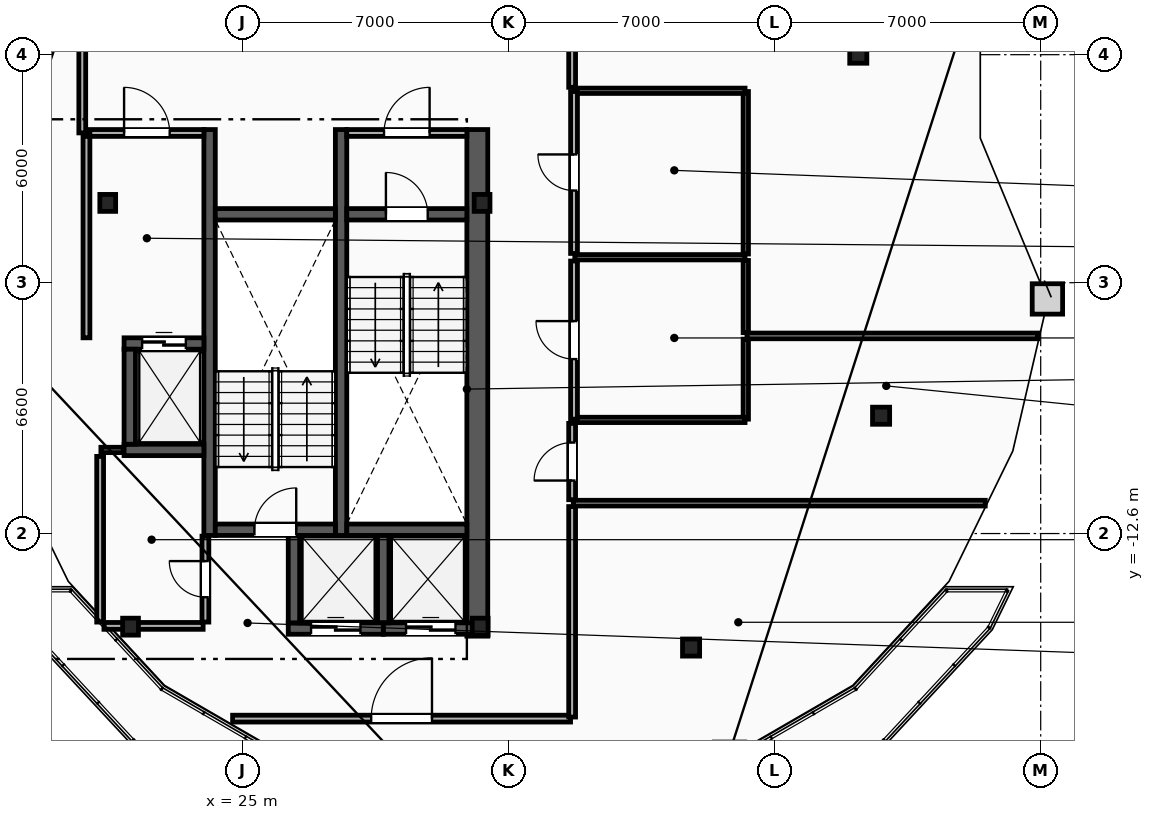
"""IFC4 building model, lengths in metres.
Left out: names, types, materials, properties, quantities, classifications, styles, units other than length and angle.
Written with IfcOpenShell. Run it as: python <this file> out.ifc"""

import sys

from ifc_helpers import new_model, si_unit, direction, frame, frame_2d, origin, origin_2d, place, context, subcontext, project, spatial, rectangle, hollow_rectangle, i_section, extrude, element, fill, save


model = new_model("IFC4")
c1 = context("Model", 3, precision=1e-05, world=origin(), true_north=direction((0.0, 1.0)))
c2 = subcontext(c1, "Body", "Model", "MODEL_VIEW")
j1 = project(units=[si_unit("LENGTHUNIT", "METRE"), si_unit("PLANEANGLEUNIT", "RADIAN")], contexts=[c1])
p1 = place(None, origin())
s1 = spatial("IfcSite", under=j1, at=p1, CompositionType="ELEMENT")
p2 = place(p1, origin())
s2 = spatial("IfcBuilding", under=s1, at=p2, CompositionType="ELEMENT")
p3 = place(p2, frame((0.0, 0.0, 282.8)))
s3 = spatial("IfcBuildingStorey", under=s2, at=p3, CompositionType="ELEMENT", Elevation=282.8)
for number, where, z_axis, x_axis in (
    (1, (31.3, -3.9, 0.0), (0.0, 0.0, 1.0), (1.0, 0.0, 0.0)),
    (2, (21.45, -3.9, 0.0), (0.0, 0.0, 1.0), (1.0, 0.0, 0.0)),
    (3, (22.05, -15.05, 0.0), (0.0, 0.0, 1.0), (1.0, 0.0, 0.0)),
    (4, (31.25, -15.05, 0.0), (0.0, 0.0, 1.0), (1.0, 0.0, 0.0)),
):
    element("IfcColumn", number, at=place(p3, frame(where, z_axis=z_axis, x_axis=x_axis)), inside=s3, PredefinedType="COLUMN", context=c2, shape_type="SweptSolid", body=[
        extrude(i_section(OverallWidth=0.416, OverallDepth=0.446, WebThickness=0.039, FlangeThickness=0.063, FilletRadius=0.018, at=origin_2d()), origin(), (0.0, 0.0, 1.0), 3.6),
    ])
for number, where, z_axis, x_axis in (
    (5, (41.2, 0.0, 0.0), (0.0, 0.0, 1.0), (1.0, 0.0, 0.0)),
    (6, (41.8, -9.5, 0.0), (0.0, 0.0, 1.0), (1.0, 0.0, 0.0)),
    (7, (36.8, -15.6, 0.0), (0.0, 0.0, 1.0), (1.0, 0.0, 0.0)),
):
    element("IfcColumn", number, at=place(p3, frame(where, z_axis=z_axis, x_axis=x_axis)), inside=s3, PredefinedType="COLUMN", context=c2, shape_type="SweptSolid", body=[
        extrude(hollow_rectangle(XDim=0.45, YDim=0.45, WallThickness=0.025, at=origin_2d()), origin(), (0.0, 0.0, 1.0), 3.6),
    ])
p4 = place(p3, frame((31.175, -15.3, 0.0), z_axis=(0.0, 0.0, 1.0), x_axis=(0.0, 1.0, 0.0)))
e8 = element("IfcWall", 8, at=p4, inside=s3, PredefinedType="SHEAR", context=c2, shape_type="SweptSolid", body=[
    extrude(rectangle(XDim=13.33, YDim=0.55, at=frame_2d((6.665, 0.0))), origin(), (0.0, 0.0, 1.0), 3.34),
])
for number, where, z_axis, x_axis in (
    (9, (27.59, -12.65, 0.0), (0.0, 0.0, 1.0), (0.0, 1.0, 0.0)),
    (10, (24.13, -12.65, 0.0), (0.0, 0.0, 1.0), (0.0, 1.0, 0.0)),
):
    element("IfcWall", number, at=place(p3, frame(where, z_axis=z_axis, x_axis=x_axis)), inside=s3, PredefinedType="SHEAR", context=c2, shape_type="SweptSolid", body=[
        extrude(rectangle(XDim=10.68, YDim=0.3, at=frame_2d((5.34, 0.0))), origin(), (0.0, 0.0, 1.0), 3.34),
    ])
p5 = place(p3, frame((27.74, -4.2, 0.0), z_axis=(0.0, 0.0, 1.0), x_axis=(1.0, 0.0, 0.0)))
e11 = element("IfcWall", 11, at=p5, inside=s3, PredefinedType="SHEAR", context=c2, shape_type="SweptSolid", body=[
    extrude(rectangle(XDim=3.16, YDim=0.3, at=frame_2d((1.58, 0.0))), origin(), (0.0, 0.0, 1.0), 3.34),
])
p6 = place(p5, frame((1.03, 0.0, 0.0)))
e12 = element("IfcOpeningElement", 12, at=p6, cuts=e11, PredefinedType="OPENING", context=c2, shape_type="SweptSolid", body=[
    extrude(rectangle(XDim=1.1, YDim=2.15, at=frame_2d((0.55, 1.075))), frame((0.0, 0.16, 0.0), z_axis=(0.0, -1.0, 0.0), x_axis=(1.0, 0.0, 0.0)), (0.0, 0.0, 1.0), 0.32),
])
p7 = place(p3, frame((27.74, -12.5, 0.0), z_axis=(0.0, 0.0, 1.0), x_axis=(1.0, 0.0, 0.0)))
e13 = element("IfcWall", 13, at=p7, inside=s3, PredefinedType="SHEAR", context=c2, shape_type="SweptSolid", body=[
    extrude(rectangle(XDim=3.16, YDim=0.3, at=frame_2d((1.58, 0.0))), origin(), (0.0, 0.0, 1.0), 3.34),
])
p8 = place(p3, frame((24.28, -12.5, 0.0), z_axis=(0.0, 0.0, 1.0), x_axis=(1.0, 0.0, 0.0)))
e14 = element("IfcWall", 14, at=p8, inside=s3, PredefinedType="SHEAR", context=c2, shape_type="SweptSolid", body=[
    extrude(rectangle(XDim=3.16, YDim=0.3, at=frame_2d((1.58, 0.0))), origin(), (0.0, 0.0, 1.0), 3.34),
])
p9 = place(p8, frame((1.03, 0.0, 0.0)))
e15 = element("IfcOpeningElement", 15, at=p9, cuts=e14, PredefinedType="OPENING", context=c2, shape_type="SweptSolid", body=[
    extrude(rectangle(XDim=1.1, YDim=2.15, at=frame_2d((0.55, 1.075))), frame((0.0, 0.16, 0.0), z_axis=(0.0, -1.0, 0.0), x_axis=(1.0, 0.0, 0.0)), (0.0, 0.0, 1.0), 0.32),
])
p10 = place(p3, frame((24.28, -4.2, 0.0), z_axis=(0.0, 0.0, 1.0), x_axis=(1.0, 0.0, 0.0)))
e16 = element("IfcWall", 16, at=p10, inside=s3, PredefinedType="SHEAR", context=c2, shape_type="SweptSolid", body=[
    extrude(rectangle(XDim=3.16, YDim=0.3, at=frame_2d((1.58, 0.0))), origin(), (0.0, 0.0, 1.0), 3.34),
])
p11 = place(p3, frame((20.89, -7.45, 0.0), z_axis=(0.0, 0.0, 1.0), x_axis=(0.0, 1.0, 0.0)))
e17 = element("IfcWall", 17, at=p11, inside=s3, PredefinedType="PARTITIONING", context=c2, shape_type="SweptSolid", body=[
    extrude(rectangle(XDim=5.3, YDim=0.18, at=frame_2d((2.65, 0.0))), origin(), (0.0, 0.0, 1.0), 3.34),
])
p12 = place(p3, frame((20.98, -2.06, 0.0), z_axis=(0.0, 0.0, 1.0), x_axis=(1.0, 0.0, 0.0)))
e18 = element("IfcWall", 18, at=p12, inside=s3, PredefinedType="PARTITIONING", context=c2, shape_type="SweptSolid", body=[
    extrude(rectangle(XDim=3.0, YDim=0.18, at=frame_2d((1.5, 0.0))), origin(), (0.0, 0.0, 1.0), 3.34),
])
p13 = place(p12, frame((0.9, 0.0, 0.0)))
e19 = element("IfcOpeningElement", 19, at=p13, cuts=e18, PredefinedType="OPENING", context=c2, shape_type="SweptSolid", body=[
    extrude(rectangle(XDim=1.2, YDim=2.15, at=frame_2d((0.6, 1.075))), frame((0.0, 0.1, 0.0), z_axis=(0.0, -1.0, 0.0), x_axis=(1.0, 0.0, 0.0)), (0.0, 0.0, 1.0), 0.2),
])
p14 = place(p3, frame((27.74, -2.06, 0.0), z_axis=(0.0, 0.0, 1.0), x_axis=(1.0, 0.0, 0.0)))
e20 = element("IfcWall", 20, at=p14, inside=s3, PredefinedType="PARTITIONING", context=c2, shape_type="SweptSolid", body=[
    extrude(rectangle(XDim=3.16, YDim=0.18, at=frame_2d((1.58, 0.0))), origin(), (0.0, 0.0, 1.0), 3.34),
])
p15 = place(p14, frame((0.98, 0.0, 0.0)))
e21 = element("IfcOpeningElement", 21, at=p15, cuts=e20, PredefinedType="OPENING", context=c2, shape_type="SweptSolid", body=[
    extrude(rectangle(XDim=1.2, YDim=2.15, at=frame_2d((0.6, 1.075))), frame((0.0, 0.1, 0.0), z_axis=(0.0, -1.0, 0.0), x_axis=(1.0, 0.0, 0.0)), (0.0, 0.0, 1.0), 0.2),
])
p16 = place(p3, frame((21.88, -7.6, 0.0), z_axis=(0.0, 0.0, 1.0), x_axis=(1.0, 0.0, 0.0)))
e22 = element("IfcWall", 22, at=p16, inside=s3, PredefinedType="SHEAR", context=c2, shape_type="SweptSolid", body=[
    extrude(rectangle(XDim=2.1, YDim=0.3, at=frame_2d((1.05, 0.0))), origin(), (0.0, 0.0, 1.0), 3.34),
])
p17 = place(p16, frame((0.475, 0.0, 0.0)))
e23 = element("IfcOpeningElement", 23, at=p17, cuts=e22, PredefinedType="OPENING", context=c2, shape_type="SweptSolid", body=[
    extrude(rectangle(XDim=1.15, YDim=2.2, at=frame_2d((0.575, 1.1))), frame((0.0, 0.16, 0.0), z_axis=(0.0, -1.0, 0.0), x_axis=(1.0, 0.0, 0.0)), (0.0, 0.0, 1.0), 0.32),
])
p18 = place(p3, frame((21.88, -10.4, 0.0), z_axis=(0.0, 0.0, 1.0), x_axis=(1.0, 0.0, 0.0)))
e24 = element("IfcWall", 24, at=p18, inside=s3, PredefinedType="SHEAR", context=c2, shape_type="SweptSolid", body=[
    extrude(rectangle(XDim=2.1, YDim=0.3, at=frame_2d((1.05, 0.0))), origin(), (0.0, 0.0, 1.0), 3.34),
])
p19 = place(p3, frame((22.03, -10.25, 0.0), z_axis=(0.0, 0.0, 1.0), x_axis=(0.0, 1.0, 0.0)))
e25 = element("IfcWall", 25, at=p19, inside=s3, PredefinedType="SHEAR", context=c2, shape_type="SweptSolid", body=[
    extrude(rectangle(XDim=2.5, YDim=0.3, at=frame_2d((1.25, 0.0))), origin(), (0.0, 0.0, 1.0), 3.34),
])
p20 = place(p3, frame((28.7, -15.1, 0.0), z_axis=(0.0, 0.0, 1.0), x_axis=(1.0, 0.0, 0.0)))
e26 = element("IfcWall", 26, at=p20, inside=s3, PredefinedType="SHEAR", context=c2, shape_type="SweptSolid", body=[
    extrude(rectangle(XDim=2.5, YDim=0.3, at=frame_2d((1.25, 0.0))), origin(), (0.0, 0.0, 1.0), 3.34),
])
p21 = place(p20, frame((0.6, 0.0, 0.0)))
e27 = element("IfcOpeningElement", 27, at=p21, cuts=e26, PredefinedType="OPENING", context=c2, shape_type="SweptSolid", body=[
    extrude(rectangle(XDim=1.3, YDim=2.2, at=frame_2d((0.65, 1.1))), frame((0.0, 0.16, 0.0), z_axis=(0.0, -1.0, 0.0), x_axis=(1.0, 0.0, 0.0)), (0.0, 0.0, 1.0), 0.32),
])
p22 = place(p3, frame((28.7, -14.95, 0.0), z_axis=(0.0, 0.0, 1.0), x_axis=(0.0, 1.0, 0.0)))
e28 = element("IfcWall", 28, at=p22, inside=s3, PredefinedType="SHEAR", context=c2, shape_type="SweptSolid", body=[
    extrude(rectangle(XDim=2.3, YDim=0.3, at=frame_2d((1.15, 0.0))), origin(), (0.0, 0.0, 1.0), 3.34),
])
p23 = place(p3, frame((26.2, -15.1, 0.0), z_axis=(0.0, 0.0, 1.0), x_axis=(1.0, 0.0, 0.0)))
e29 = element("IfcWall", 29, at=p23, inside=s3, PredefinedType="SHEAR", context=c2, shape_type="SweptSolid", body=[
    extrude(rectangle(XDim=2.5, YDim=0.3, at=frame_2d((1.25, 0.0))), origin(), (0.0, 0.0, 1.0), 3.34),
])
p24 = place(p23, frame((0.6, 0.0, 0.0)))
e30 = element("IfcOpeningElement", 30, at=p24, cuts=e29, PredefinedType="OPENING", context=c2, shape_type="SweptSolid", body=[
    extrude(rectangle(XDim=1.3, YDim=2.2, at=frame_2d((0.65, 1.1))), frame((0.0, 0.16, 0.0), z_axis=(0.0, -1.0, 0.0), x_axis=(1.0, 0.0, 0.0)), (0.0, 0.0, 1.0), 0.32),
])
p25 = place(p3, frame((26.35, -14.95, 0.0), z_axis=(0.0, 0.0, 1.0), x_axis=(0.0, 1.0, 0.0)))
e31 = element("IfcWall", 31, at=p25, inside=s3, PredefinedType="SHEAR", context=c2, shape_type="SweptSolid", body=[
    extrude(rectangle(XDim=2.3, YDim=0.3, at=frame_2d((1.15, 0.0))), origin(), (0.0, 0.0, 1.0), 3.34),
])
p26 = place(p3, frame((21.27, -10.4, 0.0), z_axis=(0.0, 0.0, 1.0), x_axis=(1.0, 0.0, 0.0)))
e32 = element("IfcWall", 32, at=p26, inside=s3, PredefinedType="PARTITIONING", context=c2, shape_type="SweptSolid", body=[
    extrude(rectangle(XDim=0.59, YDim=0.14, at=frame_2d((0.295, 0.0))), origin(), (0.0, 0.0, 1.0), 3.34),
])
p27 = place(p3, frame((21.25, -14.93, 0.0), z_axis=(0.0, 0.0, 1.0), x_axis=(0.0, 1.0, 0.0)))
e33 = element("IfcWall", 33, at=p27, inside=s3, PredefinedType="PARTITIONING", context=c2, shape_type="SweptSolid", body=[
    extrude(rectangle(XDim=4.36, YDim=0.18, at=frame_2d((2.18, 0.0))), origin(), (0.0, 0.0, 1.0), 3.34),
])
p28 = place(p3, frame((21.35, -15.03, 0.0), z_axis=(0.0, 0.0, 1.0), x_axis=(1.0, 0.0, 0.0)))
e34 = element("IfcWall", 34, at=p28, inside=s3, PredefinedType="PARTITIONING", context=c2, shape_type="SweptSolid", body=[
    extrude(rectangle(XDim=2.61, YDim=0.18, at=frame_2d((1.305, 0.0))), origin(), (0.0, 0.0, 1.0), 2.413),
])
p29 = place(p3, frame((24.02, -14.93, 0.0), z_axis=(0.0, 0.0, 1.0), x_axis=(0.0, 1.0, 0.0)))
e35 = element("IfcWall", 35, at=p29, inside=s3, PredefinedType="PARTITIONING", context=c2, shape_type="SweptSolid", body=[
    extrude(rectangle(XDim=2.26, YDim=0.18, at=frame_2d((1.13, 0.0))), origin(), (0.0, 0.0, 1.0), 3.34),
])
p30 = place(p29, frame((0.655, 0.0, 0.0)))
e36 = element("IfcOpeningElement", 36, at=p30, cuts=e35, PredefinedType="OPENING", context=c2, shape_type="SweptSolid", body=[
    extrude(rectangle(XDim=0.95, YDim=2.1, at=frame_2d((0.475, 1.05))), frame((0.0, 0.1, 0.0), z_axis=(0.0, -1.0, 0.0), x_axis=(1.0, 0.0, 0.0)), (0.0, 0.0, 1.0), 0.2),
])
p31 = place(p3, frame((38.24, -9.59, 0.0), z_axis=(0.0, 0.0, 1.0), x_axis=(0.0, 1.0, 0.0)))
e37 = element("IfcWall", 37, at=p31, inside=s3, PredefinedType="PARTITIONING", context=c2, shape_type="SweptSolid", body=[
    extrude(rectangle(XDim=2.105, YDim=0.14, at=frame_2d((1.052, 0.0))), origin(), (0.0, 0.0, 1.0), 3.34),
])
p32 = place(p3, frame((38.24, -7.315, 0.0), z_axis=(0.0, 0.0, 1.0), x_axis=(0.0, 1.0, 0.0)))
e38 = element("IfcWall", 38, at=p32, inside=s3, PredefinedType="PARTITIONING", context=c2, shape_type="SweptSolid", body=[
    extrude(rectangle(XDim=1.9, YDim=0.14, at=frame_2d((0.95, 0.0))), origin(), (0.0, 0.0, 1.0), 3.34),
])
p33 = place(p3, frame((38.24, -5.245, 0.0), z_axis=(0.0, 0.0, 1.0), x_axis=(0.0, 1.0, 0.0)))
e39 = element("IfcWall", 39, at=p33, inside=s3, PredefinedType="PARTITIONING", context=c2, shape_type="SweptSolid", body=[
    extrude(rectangle(XDim=4.275, YDim=0.14, at=frame_2d((2.138, 0.0))), origin(), (0.0, 0.0, 1.0), 3.34),
])
for number, where, z_axis, x_axis in (
    (40, (33.74, -0.95, 0.0), (0.0, 0.0, 1.0), (1.0, 0.0, 0.0)),
    (41, (33.74, -5.33, 0.0), (0.0, 0.0, 1.0), (1.0, 0.0, 0.0)),
    (42, (33.74, -9.61, 0.0), (0.0, 0.0, 1.0), (1.0, 0.0, 0.0)),
):
    element("IfcWall", number, at=place(p3, frame(where, z_axis=z_axis, x_axis=x_axis)), inside=s3, PredefinedType="PARTITIONING", context=c2, shape_type="SweptSolid", body=[
        extrude(rectangle(XDim=4.48, YDim=0.14, at=frame_2d((2.24, 0.0))), origin(), (0.0, 0.0, 1.0), 3.34),
    ])
p34 = place(p3, frame((33.72, -5.23, 0.0), z_axis=(0.0, 0.0, 1.0), x_axis=(0.0, 1.0, 0.0)))
e43 = element("IfcWall", 43, at=p34, inside=s3, PredefinedType="PARTITIONING", context=c2, shape_type="SweptSolid", body=[
    extrude(rectangle(XDim=4.26, YDim=0.18, at=frame_2d((2.13, 0.0))), origin(), (0.0, 0.0, 1.0), 3.34),
])
p35 = place(p34, frame((1.655, 0.0, 0.0)))
e44 = element("IfcOpeningElement", 44, at=p35, cuts=e43, PredefinedType="OPENING", context=c2, shape_type="SweptSolid", body=[
    extrude(rectangle(XDim=0.95, YDim=2.1, at=frame_2d((0.475, 1.05))), frame((0.0, 0.1, 0.0), z_axis=(0.0, -1.0, 0.0), x_axis=(1.0, 0.0, 0.0)), (0.0, 0.0, 1.0), 0.2),
])
p36 = place(p3, frame((33.72, -9.59, 0.0), z_axis=(0.0, 0.0, 1.0), x_axis=(0.0, 1.0, 0.0)))
e45 = element("IfcWall", 45, at=p36, inside=s3, PredefinedType="PARTITIONING", context=c2, shape_type="SweptSolid", body=[
    extrude(rectangle(XDim=4.16, YDim=0.18, at=frame_2d((2.08, 0.0))), origin(), (0.0, 0.0, 1.0), 3.34),
])
p37 = place(p36, frame((1.58, 0.0, 0.0)))
e46 = element("IfcOpeningElement", 46, at=p37, cuts=e45, PredefinedType="OPENING", context=c2, shape_type="SweptSolid", body=[
    extrude(rectangle(XDim=1.0, YDim=2.15, at=frame_2d((0.5, 1.075))), frame((0.0, 0.1, 0.0), z_axis=(0.0, -1.0, 0.0), x_axis=(1.0, 0.0, 0.0)), (0.0, 0.0, 1.0), 0.2),
])
p38 = place(p3, frame((38.27, -7.4, 0.0), z_axis=(0.0, 0.0, 1.0), x_axis=(1.0, 0.0, 0.0)))
e47 = element("IfcWall", 47, at=p38, inside=s3, PredefinedType="PARTITIONING", context=c2, shape_type="SweptSolid", body=[
    extrude(rectangle(XDim=7.649, YDim=0.15, at=frame_2d((3.824, 0.0))), origin(), (0.0, 0.0, 1.0), 3.34),
])
p39 = place(p3, frame((33.7, -11.8, 0.0), z_axis=(0.0, 0.0, 1.0), x_axis=(1.0, 0.0, 0.0)))
e48 = element("IfcWall", 48, at=p39, inside=s3, PredefinedType="PARTITIONING", context=c2, shape_type="SweptSolid", body=[
    extrude(rectangle(XDim=10.842, YDim=0.15, at=frame_2d((5.421, 0.0))), origin(), (0.0, 0.0, 1.0), 3.34),
])
p40 = place(p3, frame((24.736, -17.47, 0.0), z_axis=(0.0, 0.0, 1.0), x_axis=(1.0, 0.0, 0.0)))
e49 = element("IfcWall", 49, at=p40, inside=s3, PredefinedType="PARTITIONING", context=c2, shape_type="SweptSolid", body=[
    extrude(rectangle(XDim=8.892, YDim=0.18, at=frame_2d((4.446, 0.0))), origin(), (0.0, 0.0, 1.0), 3.34),
])
p41 = place(p40, frame((3.646, 0.0, 0.0)))
e50 = element("IfcOpeningElement", 50, at=p41, cuts=e49, PredefinedType="OPENING", context=c2, shape_type="SweptSolid", body=[
    extrude(rectangle(XDim=1.6, YDim=2.2, at=frame_2d((0.8, 1.1))), frame((0.0, 0.1, 0.0), z_axis=(0.0, -1.0, 0.0), x_axis=(1.0, 0.0, 0.0)), (0.0, 0.0, 1.0), 0.2),
])
p42 = place(p3, frame((33.67, -17.428, 0.0), z_axis=(0.0, 0.0, 1.0), x_axis=(0.0, 1.0, 0.0)))
e51 = element("IfcWall", 51, at=p42, inside=s3, PredefinedType="PARTITIONING", context=c2, shape_type="SweptSolid", body=[
    extrude(rectangle(XDim=5.539, YDim=0.18, at=frame_2d((2.769, 0.0))), origin(), (0.0, 0.0, 1.0), 3.34),
])
p43 = place(p3, frame((33.67, -11.71, 0.0), z_axis=(0.0, 0.0, 1.0), x_axis=(0.0, 1.0, 0.0)))
e52 = element("IfcWall", 52, at=p43, inside=s3, PredefinedType="PARTITIONING", context=c2, shape_type="SweptSolid", body=[
    extrude(rectangle(XDim=2.009, YDim=0.18, at=frame_2d((1.004, 0.0))), origin(), (0.0, 0.0, 1.0), 3.34),
])
p44 = place(p43, frame((0.504, 0.0, 0.0)))
e53 = element("IfcOpeningElement", 53, at=p44, cuts=e52, PredefinedType="OPENING", context=c2, shape_type="SweptSolid", body=[
    extrude(rectangle(XDim=1.0, YDim=2.15, at=frame_2d((0.5, 1.075))), frame((0.0, 0.1, 0.0), z_axis=(0.0, -1.0, 0.0), x_axis=(1.0, 0.0, 0.0)), (0.0, 0.0, 1.0), 0.2),
])
p45 = place(p3, frame((20.78, 0.329, 0.0), z_axis=(0.0, 0.0, 1.0), x_axis=(0.0, -1.0, 0.0)))
e54 = element("IfcWall", 54, at=p45, inside=s3, PredefinedType="PARTITIONING", context=c2, shape_type="SweptSolid", body=[
    extrude(rectangle(XDim=2.387, YDim=0.18, at=frame_2d((1.194, 0.0))), origin(), (0.0, 0.0, 1.0), 3.34),
])
p46 = place(p3, frame((33.67, -0.859, 0.0), z_axis=(0.0, 0.0, 1.0), x_axis=(0.0, 1.0, 0.0)))
e55 = element("IfcWall", 55, at=p46, inside=s3, PredefinedType="PARTITIONING", context=c2, shape_type="SweptSolid", body=[
    extrude(rectangle(XDim=1.187, YDim=0.18, at=frame_2d((0.594, 0.0))), origin(), (0.0, 0.0, 1.0), 3.34),
])
p47 = place(p6, origin())
e56 = element("IfcDoor", 56, at=p47, inside=s3, OperationType="SINGLE_SWING_LEFT", PredefinedType="DOOR", context=c2, shape_type="SweptSolid", body=[
    extrude(rectangle(XDim=1.1, YDim=2.15, at=frame_2d((0.55, 1.075))), frame((0.0, 0.025, 0.0), z_axis=(0.0, -1.0, 0.0), x_axis=(1.0, 0.0, 0.0)), (0.0, 0.0, 1.0), 0.05),
])
fill(e12, e56)
p48 = place(p9, origin())
e57 = element("IfcDoor", 57, at=p48, inside=s3, OperationType="SINGLE_SWING_RIGHT", PredefinedType="DOOR", context=c2, shape_type="SweptSolid", body=[
    extrude(rectangle(XDim=1.1, YDim=2.15, at=frame_2d((0.55, 1.075))), frame((0.0, 0.025, 0.0), z_axis=(0.0, -1.0, 0.0), x_axis=(1.0, 0.0, 0.0)), (0.0, 0.0, 1.0), 0.05),
])
fill(e15, e57)
p49 = place(p13, origin())
e58 = element("IfcDoor", 58, at=p49, inside=s3, OperationType="SINGLE_SWING_LEFT", PredefinedType="DOOR", context=c2, shape_type="SweptSolid", body=[
    extrude(rectangle(XDim=1.2, YDim=2.15, at=frame_2d((0.6, 1.075))), frame((0.0, 0.025, 0.0), z_axis=(0.0, -1.0, 0.0), x_axis=(1.0, 0.0, 0.0)), (0.0, 0.0, 1.0), 0.05),
])
fill(e19, e58)
p50 = place(p15, origin())
e59 = element("IfcDoor", 59, at=p50, inside=s3, OperationType="SINGLE_SWING_RIGHT", PredefinedType="DOOR", context=c2, shape_type="SweptSolid", body=[
    extrude(rectangle(XDim=1.2, YDim=2.15, at=frame_2d((0.6, 1.075))), frame((0.0, 0.025, 0.0), z_axis=(0.0, -1.0, 0.0), x_axis=(1.0, 0.0, 0.0)), (0.0, 0.0, 1.0), 0.05),
])
fill(e21, e59)
p51 = place(p17, origin())
e60 = element("IfcDoor", 60, at=p51, inside=s3, OperationType="SLIDING_TO_LEFT", PredefinedType="TRAPDOOR", context=c2, shape_type="SweptSolid", body=[
    extrude(rectangle(XDim=1.15, YDim=2.2, at=frame_2d((0.575, 1.1))), frame((0.0, 0.025, 0.0), z_axis=(0.0, -1.0, 0.0), x_axis=(1.0, 0.0, 0.0)), (0.0, 0.0, 1.0), 0.05),
])
fill(e23, e60)
p52 = place(p21, origin())
e61 = element("IfcDoor", 61, at=p52, inside=s3, OperationType="SLIDING_TO_LEFT", PredefinedType="TRAPDOOR", context=c2, shape_type="SweptSolid", body=[
    extrude(rectangle(XDim=1.3, YDim=2.2, at=frame_2d((0.65, 1.1))), frame((0.0, 0.025, 0.0), z_axis=(0.0, -1.0, 0.0), x_axis=(1.0, 0.0, 0.0)), (0.0, 0.0, 1.0), 0.05),
])
fill(e27, e61)
p53 = place(p24, origin())
e62 = element("IfcDoor", 62, at=p53, inside=s3, OperationType="SLIDING_TO_LEFT", PredefinedType="TRAPDOOR", context=c2, shape_type="SweptSolid", body=[
    extrude(rectangle(XDim=1.3, YDim=2.2, at=frame_2d((0.65, 1.1))), frame((0.0, 0.025, 0.0), z_axis=(0.0, -1.0, 0.0), x_axis=(1.0, 0.0, 0.0)), (0.0, 0.0, 1.0), 0.05),
])
fill(e30, e62)
p54 = place(p41, origin())
e63 = element("IfcDoor", 63, at=p54, inside=s3, OperationType="SINGLE_SWING_RIGHT", PredefinedType="DOOR", context=c2, shape_type="SweptSolid", body=[
    extrude(rectangle(XDim=1.6, YDim=2.2, at=frame_2d((0.8, 1.1))), frame((0.0, 0.025, 0.0), z_axis=(0.0, -1.0, 0.0), x_axis=(1.0, 0.0, 0.0)), (0.0, 0.0, 1.0), 0.05),
])
fill(e50, e63)
p55 = place(p35, origin())
e64 = element("IfcDoor", 64, at=p55, inside=s3, OperationType="SINGLE_SWING_RIGHT", PredefinedType="DOOR", context=c2, shape_type="SweptSolid", body=[
    extrude(rectangle(XDim=0.95, YDim=2.1, at=frame_2d((0.475, 1.05))), frame((0.0, 0.025, 0.0), z_axis=(0.0, -1.0, 0.0), x_axis=(1.0, 0.0, 0.0)), (0.0, 0.0, 1.0), 0.05),
])
fill(e44, e64)
p56 = place(p37, origin())
e65 = element("IfcDoor", 65, at=p56, inside=s3, OperationType="SINGLE_SWING_RIGHT", PredefinedType="DOOR", context=c2, shape_type="SweptSolid", body=[
    extrude(rectangle(XDim=1.0, YDim=2.15, at=frame_2d((0.5, 1.075))), frame((0.0, 0.025, 0.0), z_axis=(0.0, -1.0, 0.0), x_axis=(1.0, 0.0, 0.0)), (0.0, 0.0, 1.0), 0.05),
])
fill(e46, e65)
p57 = place(p30, origin())
e66 = element("IfcDoor", 66, at=p57, inside=s3, OperationType="SINGLE_SWING_RIGHT", PredefinedType="DOOR", context=c2, shape_type="SweptSolid", body=[
    extrude(rectangle(XDim=0.95, YDim=2.1, at=frame_2d((0.475, 1.05))), frame((0.0, 0.025, 0.0), z_axis=(0.0, -1.0, 0.0), x_axis=(1.0, 0.0, 0.0)), (0.0, 0.0, 1.0), 0.05),
])
fill(e36, e66)
p58 = place(p44, origin())
e67 = element("IfcDoor", 67, at=p58, inside=s3, OperationType="SINGLE_SWING_LEFT", PredefinedType="DOOR", context=c2, shape_type="SweptSolid", body=[
    extrude(rectangle(XDim=1.0, YDim=2.15, at=frame_2d((0.5, 1.075))), frame((0.0, 0.025, 0.0), z_axis=(0.0, -1.0, 0.0), x_axis=(1.0, 0.0, 0.0)), (0.0, 0.0, 1.0), 0.05),
])
fill(e53, e67)
save(model, sys.argv[1])
